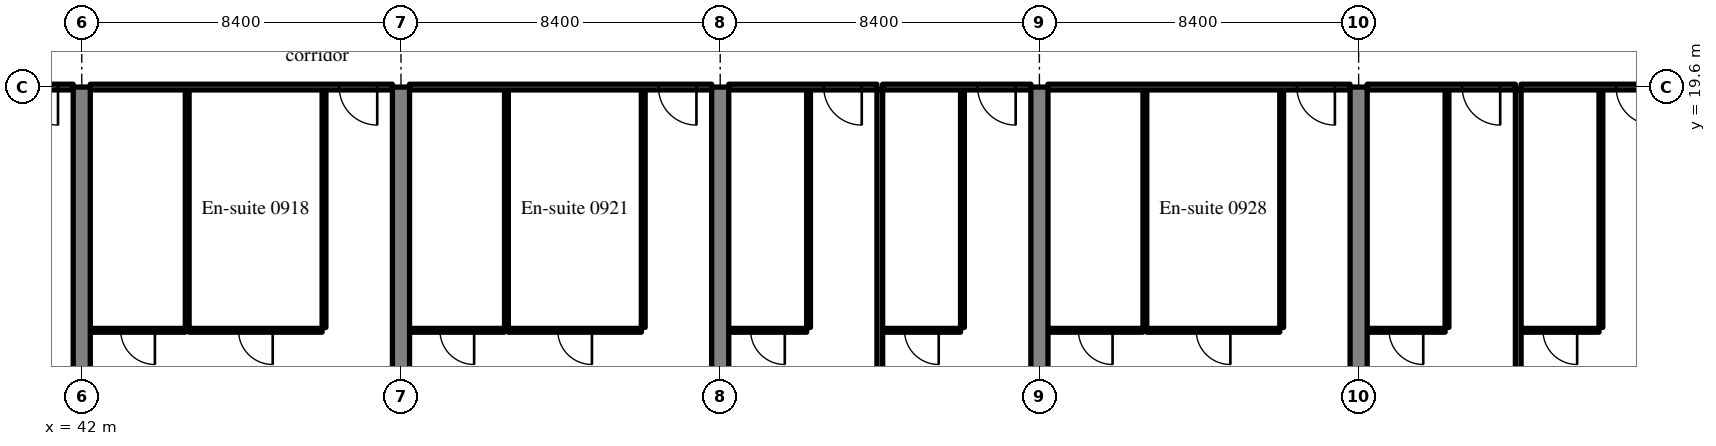
"""IFC4 building model, lengths in metres.
Left out: names, types, materials, properties, quantities, classifications, styles, units other than length and angle.
Written with IfcOpenShell. Run it as: python <this file> out.ifc"""

import sys

from ifc_helpers import new_model, si_unit, direction, frame, frame_2d, origin, place, context, subcontext, project, spatial, rectangle, extrude, source, transform, mapped, element, fill, save


model = new_model("IFC4")
c1 = context("Model", 3, precision=1e-05, world=origin(), true_north=direction((0.0, 1.0)))
c2 = subcontext(c1, "Body", "Model", "MODEL_VIEW")
j1 = project(units=[si_unit("LENGTHUNIT", "METRE"), si_unit("PLANEANGLEUNIT", "RADIAN")], contexts=[c1])
p1 = place(None, origin())
s1 = spatial("IfcSite", under=j1, at=p1, CompositionType="ELEMENT")
p2 = place(p1, origin())
s2 = spatial("IfcBuilding", under=s1, at=p2, CompositionType="ELEMENT")
p3 = place(p2, frame((0.0, 0.0, 43.0)))
s3 = spatial("IfcBuildingStorey", under=s2, at=p3, CompositionType="ELEMENT", Elevation=43.0)
m1 = source(origin(), c2, "Body", "SweptSolid", [
    extrude(rectangle(XDim=19.6, YDim=0.45, at=frame_2d((9.8, 0.0))), origin(), (0.0, 0.0, 1.0), 3.52),
])
p4 = place(p3, frame((42.0, 0.0, 0.0), z_axis=(0.0, 0.0, 1.0), x_axis=(0.0, 1.0, 0.0)))
e1 = element("IfcWall", 1, at=p4, inside=s3, PredefinedType="SHEAR", context=c2, shape_type="MappedRepresentation", body=[
    mapped(m1, transform((0.0, 0.0, 0.0), scale=1.0)),
])
m2 = source(origin(), c2, "Body", "SweptSolid", [
    extrude(rectangle(XDim=18.6, YDim=0.45, at=frame_2d((9.3, 0.0))), origin(), (0.0, 0.0, 1.0), 3.52),
])
p5 = place(p3, frame((50.4, 1.0, 0.0), z_axis=(0.0, 0.0, 1.0), x_axis=(0.0, 1.0, 0.0)))
e2 = element("IfcWall", 2, at=p5, inside=s3, PredefinedType="SHEAR", context=c2, shape_type="MappedRepresentation", body=[
    mapped(m2, transform((0.0, 0.0, 0.0), scale=1.0)),
])
for number, where, z_axis, x_axis in (
    (3, (58.8, 0.0, 0.0), (0.0, 0.0, 1.0), (0.0, 1.0, 0.0)),
    (4, (67.2, 0.0, 0.0), (0.0, 0.0, 1.0), (0.0, 1.0, 0.0)),
    (5, (75.6, 0.0, 0.0), (0.0, 0.0, 1.0), (0.0, 1.0, 0.0)),
):
    element("IfcWall", number, at=place(p3, frame(where, z_axis=z_axis, x_axis=x_axis)), inside=s3, PredefinedType="SHEAR", context=c2, shape_type="MappedRepresentation", body=[
        mapped(m1, transform((0.0, 0.0, 0.0), scale=1.0)),
    ])
m3 = source(origin(), c2, "Body", "SweptSolid", [
    extrude(rectangle(XDim=7.95, YDim=0.15, at=frame_2d((3.975, 0.0))), origin(), (0.0, 0.0, 1.0), 2.82),
])
p6 = place(p3, frame((33.825, 19.6, 0.0), z_axis=(0.0, 0.0, 1.0), x_axis=(1.0, 0.0, 0.0)))
e6 = element("IfcWall", 6, at=p6, inside=s3, PredefinedType="PARTITIONING", context=c2, shape_type="MappedRepresentation", body=[
    mapped(m3, transform((0.0, 0.0, 0.0), scale=1.0)),
])
m4 = source(origin(), c2, "Body", "SweptSolid", [
    extrude(rectangle(XDim=1.0, YDim=2.1, at=frame_2d((0.5, 1.05))), frame((0.0, 0.085, 0.0), z_axis=(0.0, -1.0, 0.0), x_axis=(1.0, 0.0, 0.0)), (0.0, 0.0, 1.0), 0.17),
])
p7 = place(p6, frame((6.55, 0.0, 0.0)))
e7 = element("IfcOpeningElement", 7, at=p7, cuts=e6, PredefinedType="OPENING", context=c2, shape_type="MappedRepresentation", body=[
    mapped(m4, transform((0.0, 0.0, 0.0), scale=1.0)),
])
m5 = source(origin(), c2, "Body", "SweptSolid", [
    extrude(rectangle(XDim=6.25, YDim=0.1, at=frame_2d((3.125, 0.0))), origin(), (0.0, 0.0, 1.0), 3.52),
])
for number, where, z_axis, x_axis in (
    (8, (48.375, 13.275, 0.0), (0.0, 0.0, 1.0), (0.0, 1.0, 0.0)),
    (9, (44.775, 13.275, 0.0), (0.0, 0.0, 1.0), (0.0, 1.0, 0.0)),
):
    element("IfcWall", number, at=place(p3, frame(where, z_axis=z_axis, x_axis=x_axis)), inside=s3, PredefinedType="PARTITIONING", context=c2, shape_type="MappedRepresentation", body=[
        mapped(m5, transform((0.0, 0.0, 0.0), scale=1.0)),
    ])
m6 = source(origin(), c2, "Body", "SweptSolid", [
    extrude(rectangle(XDim=3.5, YDim=0.1, at=frame_2d((1.75, 0.0))), origin(), (0.0, 0.0, 1.0), 3.52),
])
p8 = place(p3, frame((44.825, 13.2, 0.0), z_axis=(0.0, 0.0, 1.0), x_axis=(1.0, 0.0, 0.0)))
e10 = element("IfcWall", 10, at=p8, inside=s3, PredefinedType="PARTITIONING", context=c2, shape_type="MappedRepresentation", body=[
    mapped(m6, transform((0.0, 0.0, 0.0), scale=1.0)),
])
m7 = source(origin(), c2, "Body", "SweptSolid", [
    extrude(rectangle(XDim=0.9, YDim=2.1, at=frame_2d((0.45, 1.05))), frame((0.0, 0.06, 0.0), z_axis=(0.0, -1.0, 0.0), x_axis=(1.0, 0.0, 0.0)), (0.0, 0.0, 1.0), 0.12),
])
p9 = place(p8, frame((1.3, 0.0, 0.0)))
e11 = element("IfcOpeningElement", 11, at=p9, cuts=e10, PredefinedType="OPENING", context=c2, shape_type="MappedRepresentation", body=[
    mapped(m7, transform((0.0, 0.0, 0.0), scale=1.0)),
])
m8 = source(origin(), c2, "Body", "SweptSolid", [
    extrude(rectangle(XDim=2.5, YDim=0.1, at=frame_2d((1.25, 0.0))), origin(), (0.0, 0.0, 1.0), 3.52),
])
p10 = place(p3, frame((42.225, 13.2, 0.0), z_axis=(0.0, 0.0, 1.0), x_axis=(1.0, 0.0, 0.0)))
e12 = element("IfcWall", 12, at=p10, inside=s3, PredefinedType="PARTITIONING", context=c2, shape_type="MappedRepresentation", body=[
    mapped(m8, transform((0.0, 0.0, 0.0), scale=1.0)),
])
p11 = place(p10, frame((0.8, 0.0, 0.0)))
e13 = element("IfcOpeningElement", 13, at=p11, cuts=e12, PredefinedType="OPENING", context=c2, shape_type="MappedRepresentation", body=[
    mapped(m7, transform((0.0, 0.0, 0.0), scale=1.0)),
])
p12 = place(p3, frame((42.225, 19.6, 0.0), z_axis=(0.0, 0.0, 1.0), x_axis=(1.0, 0.0, 0.0)))
e14 = element("IfcWall", 14, at=p12, inside=s3, PredefinedType="PARTITIONING", context=c2, shape_type="MappedRepresentation", body=[
    mapped(m3, transform((0.0, 0.0, 0.0), scale=1.0)),
])
p13 = place(p12, frame((6.55, 0.0, 0.0)))
e15 = element("IfcOpeningElement", 15, at=p13, cuts=e14, PredefinedType="OPENING", context=c2, shape_type="MappedRepresentation", body=[
    mapped(m4, transform((0.0, 0.0, 0.0), scale=1.0)),
])
for number, where, z_axis, x_axis in (
    (16, (56.775, 13.275, 0.0), (0.0, 0.0, 1.0), (0.0, 1.0, 0.0)),
    (17, (53.175, 13.275, 0.0), (0.0, 0.0, 1.0), (0.0, 1.0, 0.0)),
):
    element("IfcWall", number, at=place(p3, frame(where, z_axis=z_axis, x_axis=x_axis)), inside=s3, PredefinedType="PARTITIONING", context=c2, shape_type="MappedRepresentation", body=[
        mapped(m5, transform((0.0, 0.0, 0.0), scale=1.0)),
    ])
p14 = place(p3, frame((53.225, 13.2, 0.0), z_axis=(0.0, 0.0, 1.0), x_axis=(1.0, 0.0, 0.0)))
e18 = element("IfcWall", 18, at=p14, inside=s3, PredefinedType="PARTITIONING", context=c2, shape_type="MappedRepresentation", body=[
    mapped(m6, transform((0.0, 0.0, 0.0), scale=1.0)),
])
p15 = place(p14, frame((1.3, 0.0, 0.0)))
e19 = element("IfcOpeningElement", 19, at=p15, cuts=e18, PredefinedType="OPENING", context=c2, shape_type="MappedRepresentation", body=[
    mapped(m7, transform((0.0, 0.0, 0.0), scale=1.0)),
])
p16 = place(p3, frame((50.625, 13.2, 0.0), z_axis=(0.0, 0.0, 1.0), x_axis=(1.0, 0.0, 0.0)))
e20 = element("IfcWall", 20, at=p16, inside=s3, PredefinedType="PARTITIONING", context=c2, shape_type="MappedRepresentation", body=[
    mapped(m8, transform((0.0, 0.0, 0.0), scale=1.0)),
])
p17 = place(p16, frame((0.8, 0.0, 0.0)))
e21 = element("IfcOpeningElement", 21, at=p17, cuts=e20, PredefinedType="OPENING", context=c2, shape_type="MappedRepresentation", body=[
    mapped(m7, transform((0.0, 0.0, 0.0), scale=1.0)),
])
p18 = place(p3, frame((50.625, 19.6, 0.0), z_axis=(0.0, 0.0, 1.0), x_axis=(1.0, 0.0, 0.0)))
e22 = element("IfcWall", 22, at=p18, inside=s3, PredefinedType="PARTITIONING", context=c2, shape_type="MappedRepresentation", body=[
    mapped(m3, transform((0.0, 0.0, 0.0), scale=1.0)),
])
p19 = place(p18, frame((6.55, 0.0, 0.0)))
e23 = element("IfcOpeningElement", 23, at=p19, cuts=e22, PredefinedType="OPENING", context=c2, shape_type="MappedRepresentation", body=[
    mapped(m4, transform((0.0, 0.0, 0.0), scale=1.0)),
])
p20 = place(p3, frame((61.125, 13.275, 0.0), z_axis=(0.0, 0.0, 1.0), x_axis=(0.0, 1.0, 0.0)))
e24 = element("IfcWall", 24, at=p20, inside=s3, PredefinedType="PARTITIONING", context=c2, shape_type="MappedRepresentation", body=[
    mapped(m5, transform((0.0, 0.0, 0.0), scale=1.0)),
])
m9 = source(origin(), c2, "Body", "SweptSolid", [
    extrude(rectangle(XDim=2.05, YDim=0.1, at=frame_2d((1.025, 0.0))), origin(), (0.0, 0.0, 1.0), 3.52),
])
p21 = place(p3, frame((59.025, 13.2, 0.0), z_axis=(0.0, 0.0, 1.0), x_axis=(1.0, 0.0, 0.0)))
e25 = element("IfcWall", 25, at=p21, inside=s3, PredefinedType="PARTITIONING", context=c2, shape_type="MappedRepresentation", body=[
    mapped(m9, transform((0.0, 0.0, 0.0), scale=1.0)),
])
p22 = place(p21, frame((0.575, 0.0, 0.0)))
e26 = element("IfcOpeningElement", 26, at=p22, cuts=e25, PredefinedType="OPENING", context=c2, shape_type="MappedRepresentation", body=[
    mapped(m7, transform((0.0, 0.0, 0.0), scale=1.0)),
])
m10 = source(origin(), c2, "Body", "SweptSolid", [
    extrude(rectangle(XDim=3.9, YDim=0.15, at=frame_2d((1.95, 0.0))), origin(), (0.0, 0.0, 1.0), 2.82),
])
p23 = place(p3, frame((59.025, 19.6, 0.0), z_axis=(0.0, 0.0, 1.0), x_axis=(1.0, 0.0, 0.0)))
e27 = element("IfcWall", 27, at=p23, inside=s3, PredefinedType="PARTITIONING", context=c2, shape_type="MappedRepresentation", body=[
    mapped(m10, transform((0.0, 0.0, 0.0), scale=1.0)),
])
p24 = place(p23, frame((2.5, 0.0, 0.0)))
e28 = element("IfcOpeningElement", 28, at=p24, cuts=e27, PredefinedType="OPENING", context=c2, shape_type="MappedRepresentation", body=[
    mapped(m4, transform((0.0, 0.0, 0.0), scale=1.0)),
])
p25 = place(p3, frame((65.175, 13.275, 0.0), z_axis=(0.0, 0.0, 1.0), x_axis=(0.0, 1.0, 0.0)))
e29 = element("IfcWall", 29, at=p25, inside=s3, PredefinedType="PARTITIONING", context=c2, shape_type="MappedRepresentation", body=[
    mapped(m5, transform((0.0, 0.0, 0.0), scale=1.0)),
])
p26 = place(p3, frame((63.075, 13.2, 0.0), z_axis=(0.0, 0.0, 1.0), x_axis=(1.0, 0.0, 0.0)))
e30 = element("IfcWall", 30, at=p26, inside=s3, PredefinedType="PARTITIONING", context=c2, shape_type="MappedRepresentation", body=[
    mapped(m9, transform((0.0, 0.0, 0.0), scale=1.0)),
])
p27 = place(p26, frame((0.575, 0.0, 0.0)))
e31 = element("IfcOpeningElement", 31, at=p27, cuts=e30, PredefinedType="OPENING", context=c2, shape_type="MappedRepresentation", body=[
    mapped(m7, transform((0.0, 0.0, 0.0), scale=1.0)),
])
p28 = place(p3, frame((63.075, 19.6, 0.0), z_axis=(0.0, 0.0, 1.0), x_axis=(1.0, 0.0, 0.0)))
e32 = element("IfcWall", 32, at=p28, inside=s3, PredefinedType="PARTITIONING", context=c2, shape_type="MappedRepresentation", body=[
    mapped(m10, transform((0.0, 0.0, 0.0), scale=1.0)),
])
p29 = place(p28, frame((2.5, 0.0, 0.0)))
e33 = element("IfcOpeningElement", 33, at=p29, cuts=e32, PredefinedType="OPENING", context=c2, shape_type="MappedRepresentation", body=[
    mapped(m4, transform((0.0, 0.0, 0.0), scale=1.0)),
])
m11 = source(origin(), c2, "Body", "SweptSolid", [
    extrude(rectangle(XDim=20.998, YDim=0.15, at=frame_2d((10.499, 0.0))), origin(), (0.0, 0.0, 1.0), 3.52),
])
p30 = place(p3, frame((63.0, -1.473, 0.0), z_axis=(0.0, 0.0, 1.0), x_axis=(0.0, 1.0, 0.0)))
e34 = element("IfcWall", 34, at=p30, inside=s3, PredefinedType="PARTITIONING", context=c2, shape_type="MappedRepresentation", body=[
    mapped(m11, transform((0.0, 0.0, 0.0), scale=1.0)),
])
for number, where, z_axis, x_axis in (
    (35, (73.575, 13.275, 0.0), (0.0, 0.0, 1.0), (0.0, 1.0, 0.0)),
    (36, (69.975, 13.275, 0.0), (0.0, 0.0, 1.0), (0.0, 1.0, 0.0)),
):
    element("IfcWall", number, at=place(p3, frame(where, z_axis=z_axis, x_axis=x_axis)), inside=s3, PredefinedType="PARTITIONING", context=c2, shape_type="MappedRepresentation", body=[
        mapped(m5, transform((0.0, 0.0, 0.0), scale=1.0)),
    ])
p31 = place(p3, frame((70.025, 13.2, 0.0), z_axis=(0.0, 0.0, 1.0), x_axis=(1.0, 0.0, 0.0)))
e37 = element("IfcWall", 37, at=p31, inside=s3, PredefinedType="PARTITIONING", context=c2, shape_type="MappedRepresentation", body=[
    mapped(m6, transform((0.0, 0.0, 0.0), scale=1.0)),
])
p32 = place(p31, frame((1.3, 0.0, 0.0)))
e38 = element("IfcOpeningElement", 38, at=p32, cuts=e37, PredefinedType="OPENING", context=c2, shape_type="MappedRepresentation", body=[
    mapped(m7, transform((0.0, 0.0, 0.0), scale=1.0)),
])
p33 = place(p3, frame((67.425, 13.2, 0.0), z_axis=(0.0, 0.0, 1.0), x_axis=(1.0, 0.0, 0.0)))
e39 = element("IfcWall", 39, at=p33, inside=s3, PredefinedType="PARTITIONING", context=c2, shape_type="MappedRepresentation", body=[
    mapped(m8, transform((0.0, 0.0, 0.0), scale=1.0)),
])
p34 = place(p33, frame((0.8, 0.0, 0.0)))
e40 = element("IfcOpeningElement", 40, at=p34, cuts=e39, PredefinedType="OPENING", context=c2, shape_type="MappedRepresentation", body=[
    mapped(m7, transform((0.0, 0.0, 0.0), scale=1.0)),
])
p35 = place(p3, frame((67.425, 19.6, 0.0), z_axis=(0.0, 0.0, 1.0), x_axis=(1.0, 0.0, 0.0)))
e41 = element("IfcWall", 41, at=p35, inside=s3, PredefinedType="PARTITIONING", context=c2, shape_type="MappedRepresentation", body=[
    mapped(m3, transform((0.0, 0.0, 0.0), scale=1.0)),
])
p36 = place(p35, frame((6.55, 0.0, 0.0)))
e42 = element("IfcOpeningElement", 42, at=p36, cuts=e41, PredefinedType="OPENING", context=c2, shape_type="MappedRepresentation", body=[
    mapped(m4, transform((0.0, 0.0, 0.0), scale=1.0)),
])
p37 = place(p3, frame((77.925, 13.275, 0.0), z_axis=(0.0, 0.0, 1.0), x_axis=(0.0, 1.0, 0.0)))
e43 = element("IfcWall", 43, at=p37, inside=s3, PredefinedType="PARTITIONING", context=c2, shape_type="MappedRepresentation", body=[
    mapped(m5, transform((0.0, 0.0, 0.0), scale=1.0)),
])
p38 = place(p3, frame((75.825, 13.2, 0.0), z_axis=(0.0, 0.0, 1.0), x_axis=(1.0, 0.0, 0.0)))
e44 = element("IfcWall", 44, at=p38, inside=s3, PredefinedType="PARTITIONING", context=c2, shape_type="MappedRepresentation", body=[
    mapped(m9, transform((0.0, 0.0, 0.0), scale=1.0)),
])
p39 = place(p38, frame((0.575, 0.0, 0.0)))
e45 = element("IfcOpeningElement", 45, at=p39, cuts=e44, PredefinedType="OPENING", context=c2, shape_type="MappedRepresentation", body=[
    mapped(m7, transform((0.0, 0.0, 0.0), scale=1.0)),
])
p40 = place(p3, frame((75.825, 19.6, 0.0), z_axis=(0.0, 0.0, 1.0), x_axis=(1.0, 0.0, 0.0)))
e46 = element("IfcWall", 46, at=p40, inside=s3, PredefinedType="PARTITIONING", context=c2, shape_type="MappedRepresentation", body=[
    mapped(m10, transform((0.0, 0.0, 0.0), scale=1.0)),
])
p41 = place(p40, frame((2.5, 0.0, 0.0)))
e47 = element("IfcOpeningElement", 47, at=p41, cuts=e46, PredefinedType="OPENING", context=c2, shape_type="MappedRepresentation", body=[
    mapped(m4, transform((0.0, 0.0, 0.0), scale=1.0)),
])
p42 = place(p3, frame((81.975, 13.275, 0.0), z_axis=(0.0, 0.0, 1.0), x_axis=(0.0, 1.0, 0.0)))
e48 = element("IfcWall", 48, at=p42, inside=s3, PredefinedType="PARTITIONING", context=c2, shape_type="MappedRepresentation", body=[
    mapped(m5, transform((0.0, 0.0, 0.0), scale=1.0)),
])
p43 = place(p3, frame((79.875, 13.2, 0.0), z_axis=(0.0, 0.0, 1.0), x_axis=(1.0, 0.0, 0.0)))
e49 = element("IfcWall", 49, at=p43, inside=s3, PredefinedType="PARTITIONING", context=c2, shape_type="MappedRepresentation", body=[
    mapped(m9, transform((0.0, 0.0, 0.0), scale=1.0)),
])
p44 = place(p43, frame((0.575, 0.0, 0.0)))
e50 = element("IfcOpeningElement", 50, at=p44, cuts=e49, PredefinedType="OPENING", context=c2, shape_type="MappedRepresentation", body=[
    mapped(m7, transform((0.0, 0.0, 0.0), scale=1.0)),
])
m12 = source(origin(), c2, "Body", "SweptSolid", [
    extrude(rectangle(XDim=3.9, YDim=0.15, at=frame_2d((1.95, 0.0))), origin(), (0.0, 0.0, 1.0), 2.82),
])
p45 = place(p3, frame((79.875, 19.6, 0.0), z_axis=(0.0, 0.0, 1.0), x_axis=(1.0, 0.0, 0.0)))
e51 = element("IfcWall", 51, at=p45, inside=s3, PredefinedType="PARTITIONING", context=c2, shape_type="MappedRepresentation", body=[
    mapped(m12, transform((0.0, 0.0, 0.0), scale=1.0)),
])
p46 = place(p45, frame((2.5, 0.0, 0.0)))
e52 = element("IfcOpeningElement", 52, at=p46, cuts=e51, PredefinedType="OPENING", context=c2, shape_type="MappedRepresentation", body=[
    mapped(m4, transform((0.0, 0.0, 0.0), scale=1.0)),
])
m13 = source(origin(), c2, "Body", "SweptSolid", [
    extrude(rectangle(XDim=18.625, YDim=0.15, at=frame_2d((9.312, 0.0))), origin(), (0.0, 0.0, 1.0), 3.52),
])
p47 = place(p3, frame((79.8, 0.9, 0.0), z_axis=(0.0, 0.0, 1.0), x_axis=(0.0, 1.0, 0.0)))
e53 = element("IfcWall", 53, at=p47, inside=s3, PredefinedType="PARTITIONING", context=c2, shape_type="MappedRepresentation", body=[
    mapped(m13, transform((0.0, 0.0, 0.0), scale=1.0)),
])
m14 = source(origin(), c2, "Body", "SweptSolid", [
    extrude(rectangle(XDim=1.0, YDim=2.1, at=frame_2d((0.5, 1.05))), frame((0.0, 0.025, 0.0), z_axis=(0.0, -1.0, 0.0), x_axis=(1.0, 0.0, 0.0)), (0.0, 0.0, 1.0), 0.05),
])
p48 = place(p7, origin())
e54 = element("IfcDoor", 54, at=p48, inside=s3, OperationType="SINGLE_SWING_RIGHT", PredefinedType="DOOR", context=c2, shape_type="MappedRepresentation", body=[
    mapped(m14, transform((0.0, 0.0, 0.0), scale=1.0)),
])
fill(e7, e54)
m15 = source(origin(), c2, "Body", "SweptSolid", [
    extrude(rectangle(XDim=0.9, YDim=2.1, at=frame_2d((0.45, 1.05))), frame((0.0, 0.025, 0.0), z_axis=(0.0, -1.0, 0.0), x_axis=(1.0, 0.0, 0.0)), (0.0, 0.0, 1.0), 0.05),
])
p49 = place(p9, origin())
e55 = element("IfcDoor", 55, at=p49, inside=s3, OperationType="SINGLE_SWING_RIGHT", PredefinedType="DOOR", context=c2, shape_type="MappedRepresentation", body=[
    mapped(m15, transform((0.0, 0.0, 0.0), scale=1.0)),
])
fill(e11, e55)
p50 = place(p11, origin())
e56 = element("IfcDoor", 56, at=p50, inside=s3, OperationType="SINGLE_SWING_RIGHT", PredefinedType="DOOR", context=c2, shape_type="MappedRepresentation", body=[
    mapped(m15, transform((0.0, 0.0, 0.0), scale=1.0)),
])
fill(e13, e56)
p51 = place(p13, origin())
e57 = element("IfcDoor", 57, at=p51, inside=s3, OperationType="SINGLE_SWING_RIGHT", PredefinedType="DOOR", context=c2, shape_type="MappedRepresentation", body=[
    mapped(m14, transform((0.0, 0.0, 0.0), scale=1.0)),
])
fill(e15, e57)
p52 = place(p15, origin())
e58 = element("IfcDoor", 58, at=p52, inside=s3, OperationType="SINGLE_SWING_RIGHT", PredefinedType="DOOR", context=c2, shape_type="MappedRepresentation", body=[
    mapped(m15, transform((0.0, 0.0, 0.0), scale=1.0)),
])
fill(e19, e58)
p53 = place(p17, origin())
e59 = element("IfcDoor", 59, at=p53, inside=s3, OperationType="SINGLE_SWING_RIGHT", PredefinedType="DOOR", context=c2, shape_type="MappedRepresentation", body=[
    mapped(m15, transform((0.0, 0.0, 0.0), scale=1.0)),
])
fill(e21, e59)
p54 = place(p19, origin())
e60 = element("IfcDoor", 60, at=p54, inside=s3, OperationType="SINGLE_SWING_RIGHT", PredefinedType="DOOR", context=c2, shape_type="MappedRepresentation", body=[
    mapped(m14, transform((0.0, 0.0, 0.0), scale=1.0)),
])
fill(e23, e60)
p55 = place(p22, origin())
e61 = element("IfcDoor", 61, at=p55, inside=s3, OperationType="SINGLE_SWING_RIGHT", PredefinedType="DOOR", context=c2, shape_type="MappedRepresentation", body=[
    mapped(m15, transform((0.0, 0.0, 0.0), scale=1.0)),
])
fill(e26, e61)
p56 = place(p24, origin())
e62 = element("IfcDoor", 62, at=p56, inside=s3, OperationType="SINGLE_SWING_RIGHT", PredefinedType="DOOR", context=c2, shape_type="MappedRepresentation", body=[
    mapped(m14, transform((0.0, 0.0, 0.0), scale=1.0)),
])
fill(e28, e62)
p57 = place(p27, origin())
e63 = element("IfcDoor", 63, at=p57, inside=s3, OperationType="SINGLE_SWING_RIGHT", PredefinedType="DOOR", context=c2, shape_type="MappedRepresentation", body=[
    mapped(m15, transform((0.0, 0.0, 0.0), scale=1.0)),
])
fill(e31, e63)
p58 = place(p29, origin())
e64 = element("IfcDoor", 64, at=p58, inside=s3, OperationType="SINGLE_SWING_RIGHT", PredefinedType="DOOR", context=c2, shape_type="MappedRepresentation", body=[
    mapped(m14, transform((0.0, 0.0, 0.0), scale=1.0)),
])
fill(e33, e64)
p59 = place(p32, origin())
e65 = element("IfcDoor", 65, at=p59, inside=s3, OperationType="SINGLE_SWING_RIGHT", PredefinedType="DOOR", context=c2, shape_type="MappedRepresentation", body=[
    mapped(m15, transform((0.0, 0.0, 0.0), scale=1.0)),
])
fill(e38, e65)
p60 = place(p34, origin())
e66 = element("IfcDoor", 66, at=p60, inside=s3, OperationType="SINGLE_SWING_RIGHT", PredefinedType="DOOR", context=c2, shape_type="MappedRepresentation", body=[
    mapped(m15, transform((0.0, 0.0, 0.0), scale=1.0)),
])
fill(e40, e66)
p61 = place(p36, origin())
e67 = element("IfcDoor", 67, at=p61, inside=s3, OperationType="SINGLE_SWING_RIGHT", PredefinedType="DOOR", context=c2, shape_type="MappedRepresentation", body=[
    mapped(m14, transform((0.0, 0.0, 0.0), scale=1.0)),
])
fill(e42, e67)
p62 = place(p39, origin())
e68 = element("IfcDoor", 68, at=p62, inside=s3, OperationType="SINGLE_SWING_RIGHT", PredefinedType="DOOR", context=c2, shape_type="MappedRepresentation", body=[
    mapped(m15, transform((0.0, 0.0, 0.0), scale=1.0)),
])
fill(e45, e68)
p63 = place(p41, origin())
e69 = element("IfcDoor", 69, at=p63, inside=s3, OperationType="SINGLE_SWING_RIGHT", PredefinedType="DOOR", context=c2, shape_type="MappedRepresentation", body=[
    mapped(m14, transform((0.0, 0.0, 0.0), scale=1.0)),
])
fill(e47, e69)
p64 = place(p44, origin())
e70 = element("IfcDoor", 70, at=p64, inside=s3, OperationType="SINGLE_SWING_RIGHT", PredefinedType="DOOR", context=c2, shape_type="MappedRepresentation", body=[
    mapped(m15, transform((0.0, 0.0, 0.0), scale=1.0)),
])
fill(e50, e70)
p65 = place(p46, origin())
e71 = element("IfcDoor", 71, at=p65, inside=s3, OperationType="SINGLE_SWING_RIGHT", PredefinedType="DOOR", context=c2, shape_type="MappedRepresentation", body=[
    mapped(m14, transform((0.0, 0.0, 0.0), scale=1.0)),
])
fill(e52, e71)
save(model, sys.argv[1])
